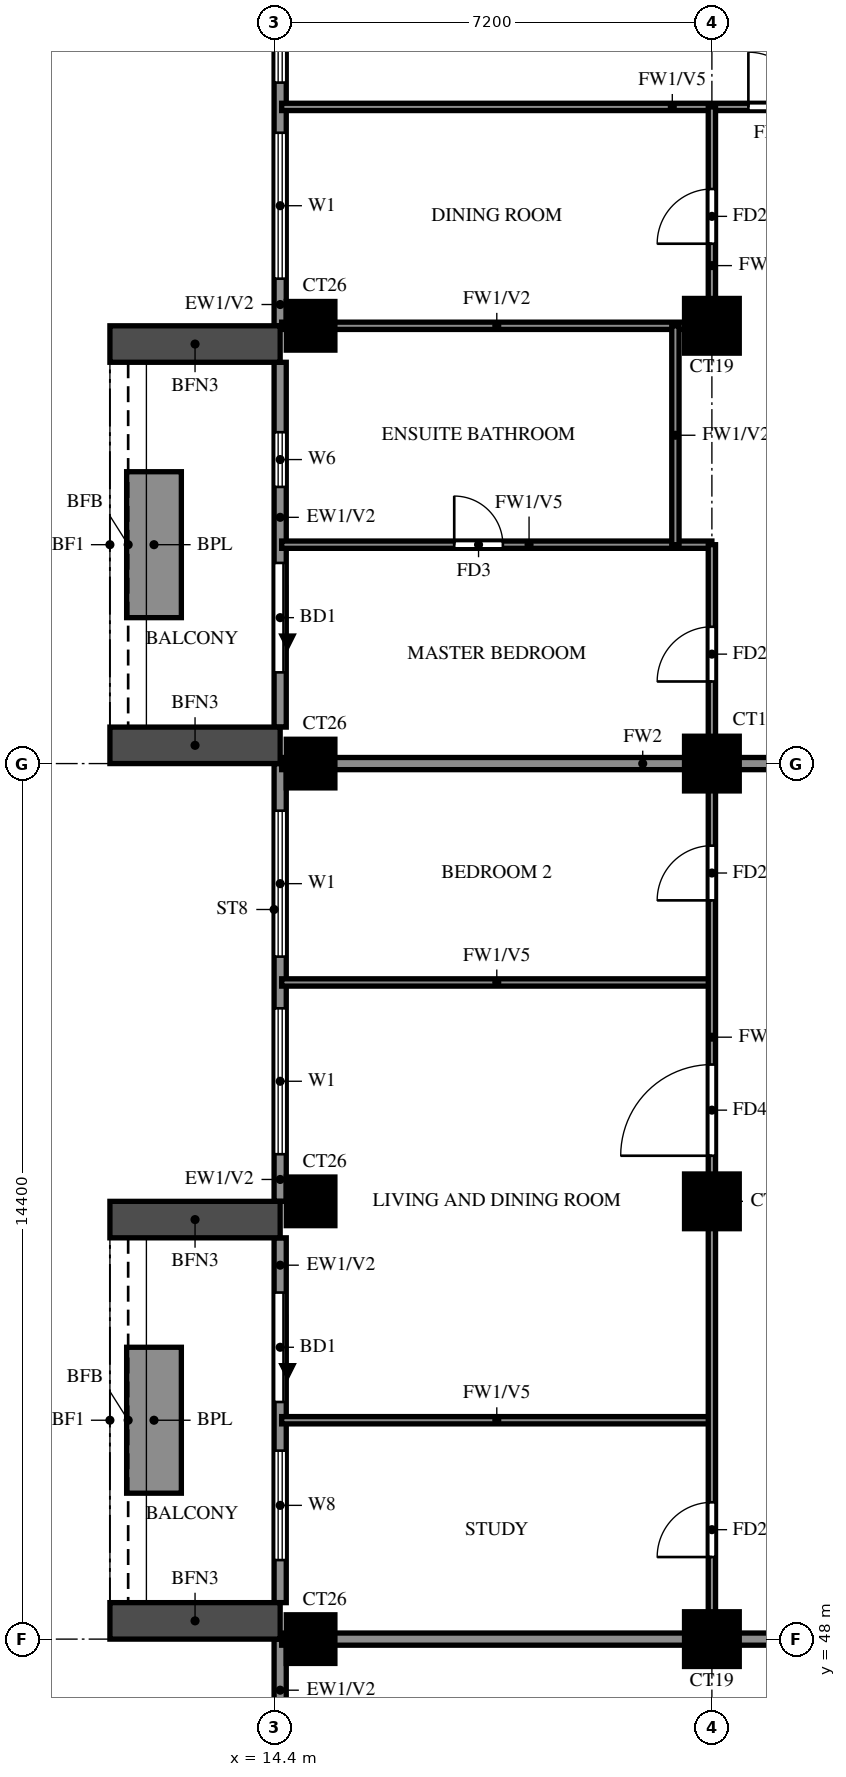
"""IFC4 building model, lengths in metres.
Left out: names, types, materials, properties, quantities, classifications, styles, units other than length and angle.
Written with IfcOpenShell. Run it as: python <this file> out.ifc"""

import sys

from ifc_helpers import new_model, si_unit, direction, frame, frame_2d, origin, origin_2d, place, context, subcontext, project, spatial, rectangle, extrude, source, transform, mapped, element, fill, save


model = new_model("IFC4")
c1 = context("Model", 3, precision=1e-05, world=origin(), true_north=direction((0.0, 1.0)))
c2 = subcontext(c1, "Body", "Model", "MODEL_VIEW")
j1 = project(units=[si_unit("LENGTHUNIT", "METRE"), si_unit("PLANEANGLEUNIT", "RADIAN")], contexts=[c1])
p1 = place(None, origin())
s1 = spatial("IfcSite", under=j1, at=p1, CompositionType="ELEMENT")
p2 = place(p1, origin())
s2 = spatial("IfcBuilding", under=s1, at=p2, CompositionType="ELEMENT")
p3 = place(p2, frame((0.0, 0.0, 195.5)))
s3 = spatial("IfcBuildingStorey", under=s2, at=p3, CompositionType="ELEMENT", Elevation=195.5)
m1 = source(origin(), c2, "Body", "SweptSolid", [
    extrude(rectangle(XDim=0.8, YDim=0.8, at=origin_2d()), origin(), (0.0, 0.0, 1.0), 3.2),
])
p4 = place(p3, frame((15.0, 48.0, 0.0), z_axis=(0.0, 0.0, 1.0), x_axis=(1.0, 0.0, 0.0)))
e1 = element("IfcColumn", 1, at=p4, inside=s3, PredefinedType="COLUMN", context=c2, shape_type="MappedRepresentation", body=[
    mapped(m1, transform((0.0, 0.0, 0.0))),
])
m2 = source(origin(), c2, "Body", "SweptSolid", [
    extrude(rectangle(XDim=0.9, YDim=0.9, at=origin_2d()), origin(), (0.0, 0.0, 1.0), 3.2),
])
p5 = place(p3, frame((21.6, 48.0, 0.0), z_axis=(0.0, 0.0, 1.0), x_axis=(1.0, 0.0, 0.0)))
e2 = element("IfcColumn", 2, at=p5, inside=s3, PredefinedType="COLUMN", context=c2, shape_type="MappedRepresentation", body=[
    mapped(m2, transform((0.0, 0.0, 0.0))),
])
p6 = place(p3, frame((15.0, 55.2, 0.0), z_axis=(0.0, 0.0, 1.0), x_axis=(1.0, 0.0, 0.0)))
e3 = element("IfcColumn", 3, at=p6, inside=s3, PredefinedType="COLUMN", context=c2, shape_type="MappedRepresentation", body=[
    mapped(m1, transform((0.0, 0.0, 0.0))),
])
p7 = place(p3, frame((21.6, 55.2, 0.0), z_axis=(0.0, 0.0, 1.0), x_axis=(1.0, 0.0, 0.0)))
e4 = element("IfcColumn", 4, at=p7, inside=s3, PredefinedType="COLUMN", context=c2, shape_type="MappedRepresentation", body=[
    mapped(m2, transform((0.0, 0.0, 0.0))),
])
p8 = place(p3, frame((15.0, 62.4, 0.0), z_axis=(0.0, 0.0, 1.0), x_axis=(1.0, 0.0, 0.0)))
e5 = element("IfcColumn", 5, at=p8, inside=s3, PredefinedType="COLUMN", context=c2, shape_type="MappedRepresentation", body=[
    mapped(m1, transform((0.0, 0.0, 0.0))),
])
p9 = place(p3, frame((21.6, 62.4, 0.0), z_axis=(0.0, 0.0, 1.0), x_axis=(1.0, 0.0, 0.0)))
e6 = element("IfcColumn", 6, at=p9, inside=s3, PredefinedType="COLUMN", context=c2, shape_type="MappedRepresentation", body=[
    mapped(m2, transform((0.0, 0.0, 0.0))),
])
p10 = place(p3, frame((15.0, 69.6, 0.0), z_axis=(0.0, 0.0, 1.0), x_axis=(1.0, 0.0, 0.0)))
e7 = element("IfcColumn", 7, at=p10, inside=s3, PredefinedType="COLUMN", context=c2, shape_type="MappedRepresentation", body=[
    mapped(m1, transform((0.0, 0.0, 0.0))),
])
p11 = place(p3, frame((21.6, 69.6, 0.0), z_axis=(0.0, 0.0, 1.0), x_axis=(1.0, 0.0, 0.0)))
e8 = element("IfcColumn", 8, at=p11, inside=s3, PredefinedType="COLUMN", context=c2, shape_type="MappedRepresentation", body=[
    mapped(m2, transform((0.0, 0.0, 0.0))),
])
p12 = place(p3, frame((14.5, 76.6, 0.0), z_axis=(0.0, 0.0, 1.0), x_axis=(0.0, -1.0, 0.0)))
e9 = element("IfcWall", 9, at=p12, inside=s3, PredefinedType="SOLIDWALL", context=c2, shape_type="SweptSolid", body=[
    extrude(rectangle(XDim=7.0, YDim=0.2, at=frame_2d((3.5, 0.0))), origin(), (0.0, 0.0, 1.0), 3.2),
])
p13 = place(p12, frame((3.825, 0.0, 0.6)))
e10 = element("IfcOpeningElement", 10, at=p13, cuts=e9, PredefinedType="OPENING", context=c2, shape_type="SweptSolid", body=[
    extrude(rectangle(XDim=2.4, YDim=2.4, at=frame_2d((1.2, 1.2))), frame((0.0, 0.11, 0.0), z_axis=(0.0, -1.0, 0.0), x_axis=(1.0, 0.0, 0.0)), (0.0, 0.0, 1.0), 0.22),
])
p14 = place(p12, frame((0.6, 0.0, 0.6)))
e11 = element("IfcOpeningElement", 11, at=p14, cuts=e9, PredefinedType="OPENING", context=c2, shape_type="SweptSolid", body=[
    extrude(rectangle(XDim=2.4, YDim=2.4, at=frame_2d((1.2, 1.2))), frame((0.0, 0.11, 0.0), z_axis=(0.0, -1.0, 0.0), x_axis=(1.0, 0.0, 0.0)), (0.0, 0.0, 1.0), 0.22),
])
p15 = place(p3, frame((14.5, 69.0, 0.0), z_axis=(0.0, 0.0, 1.0), x_axis=(0.0, -1.0, 0.0)))
e12 = element("IfcWall", 12, at=p15, inside=s3, PredefinedType="SOLIDWALL", context=c2, shape_type="SweptSolid", body=[
    extrude(rectangle(XDim=6.0, YDim=0.2, at=frame_2d((3.0, 0.0))), origin(), (0.0, 0.0, 1.0), 3.2),
])
p16 = place(p15, frame((3.3, 0.0, 0.0)))
e13 = element("IfcOpeningElement", 13, at=p16, cuts=e12, PredefinedType="OPENING", context=c2, shape_type="SweptSolid", body=[
    extrude(rectangle(XDim=1.8, YDim=2.4, at=frame_2d((0.9, 1.2))), frame((0.0, 0.11, 0.0), z_axis=(0.0, -1.0, 0.0), x_axis=(1.0, 0.0, 0.0)), (0.0, 0.0, 1.0), 0.22),
])
p17 = place(p15, frame((1.15, 0.0, 1.5)))
e14 = element("IfcOpeningElement", 14, at=p17, cuts=e12, PredefinedType="OPENING", context=c2, shape_type="SweptSolid", body=[
    extrude(rectangle(XDim=0.9, YDim=0.9, at=frame_2d((0.45, 0.45))), frame((0.0, 0.11, 0.0), z_axis=(0.0, -1.0, 0.0), x_axis=(1.0, 0.0, 0.0)), (0.0, 0.0, 1.0), 0.22),
])
p18 = place(p3, frame((14.5, 62.4, 0.0), z_axis=(0.0, 0.0, 1.0), x_axis=(0.0, -1.0, 0.0)))
e15 = element("IfcWall", 15, at=p18, inside=s3, PredefinedType="SOLIDWALL", context=c2, shape_type="SweptSolid", body=[
    extrude(rectangle(XDim=7.2, YDim=0.2, at=frame_2d((3.6, 0.0))), origin(), (0.0, 0.0, 1.0), 3.2),
])
p19 = place(p18, frame((4.025, 0.0, 0.6)))
e16 = element("IfcOpeningElement", 16, at=p19, cuts=e15, PredefinedType="OPENING", context=c2, shape_type="SweptSolid", body=[
    extrude(rectangle(XDim=2.4, YDim=2.4, at=frame_2d((1.2, 1.2))), frame((0.0, 0.11, 0.0), z_axis=(0.0, -1.0, 0.0), x_axis=(1.0, 0.0, 0.0)), (0.0, 0.0, 1.0), 0.22),
])
p20 = place(p18, frame((0.775, 0.0, 0.6)))
e17 = element("IfcOpeningElement", 17, at=p20, cuts=e15, PredefinedType="OPENING", context=c2, shape_type="SweptSolid", body=[
    extrude(rectangle(XDim=2.4, YDim=2.4, at=frame_2d((1.2, 1.2))), frame((0.0, 0.11, 0.0), z_axis=(0.0, -1.0, 0.0), x_axis=(1.0, 0.0, 0.0)), (0.0, 0.0, 1.0), 0.22),
])
p21 = place(p3, frame((14.5, 54.6, 0.0), z_axis=(0.0, 0.0, 1.0), x_axis=(0.0, -1.0, 0.0)))
e18 = element("IfcWall", 18, at=p21, inside=s3, PredefinedType="SOLIDWALL", context=c2, shape_type="SweptSolid", body=[
    extrude(rectangle(XDim=6.0, YDim=0.2, at=frame_2d((3.0, 0.0))), origin(), (0.0, 0.0, 1.0), 3.2),
])
p22 = place(p21, frame((0.9, 0.0, 0.0)))
e19 = element("IfcOpeningElement", 19, at=p22, cuts=e18, PredefinedType="OPENING", context=c2, shape_type="SweptSolid", body=[
    extrude(rectangle(XDim=1.8, YDim=2.4, at=frame_2d((0.9, 1.2))), frame((0.0, 0.11, 0.0), z_axis=(0.0, -1.0, 0.0), x_axis=(1.0, 0.0, 0.0)), (0.0, 0.0, 1.0), 0.22),
])
p23 = place(p21, frame((3.5, 0.0, 0.6)))
e20 = element("IfcOpeningElement", 20, at=p23, cuts=e18, PredefinedType="OPENING", context=c2, shape_type="SweptSolid", body=[
    extrude(rectangle(XDim=1.8, YDim=2.4, at=frame_2d((0.9, 1.2))), frame((0.0, 0.11, 0.0), z_axis=(0.0, -1.0, 0.0), x_axis=(1.0, 0.0, 0.0)), (0.0, 0.0, 1.0), 0.22),
])
p24 = place(p3, frame((14.5, 48.0, 0.0), z_axis=(0.0, 0.0, 1.0), x_axis=(0.0, -1.0, 0.0)))
e21 = element("IfcWall", 21, at=p24, inside=s3, PredefinedType="SOLIDWALL", context=c2, shape_type="SweptSolid", body=[
    extrude(rectangle(XDim=4.8, YDim=0.2, at=frame_2d((2.4, 0.0))), origin(), (0.0, 0.0, 1.0), 3.2),
])
p25 = place(p24, frame((1.275, 0.0, 0.6)))
e22 = element("IfcOpeningElement", 22, at=p25, cuts=e21, PredefinedType="OPENING", context=c2, shape_type="SweptSolid", body=[
    extrude(rectangle(XDim=2.4, YDim=2.4, at=frame_2d((1.2, 1.2))), frame((0.0, 0.11, 0.0), z_axis=(0.0, -1.0, 0.0), x_axis=(1.0, 0.0, 0.0)), (0.0, 0.0, 1.0), 0.22),
])
for number, where, z_axis, x_axis in (
    (23, (14.5, 69.3, 0.0), (0.0, 0.0, 1.0), (-1.0, 0.0, 0.0)),
    (24, (14.5, 62.7, 0.0), (0.0, 0.0, 1.0), (-1.0, 0.0, 0.0)),
):
    element("IfcWall", number, at=place(p3, frame(where, z_axis=z_axis, x_axis=x_axis)), inside=s3, PredefinedType="SOLIDWALL", context=c2, shape_type="SweptSolid", body=[
        extrude(rectangle(XDim=2.8, YDim=0.6, at=frame_2d((1.4, 0.0))), origin(), (0.0, 0.0, 1.0), 2.85),
    ])
p26 = place(p3, frame((12.425, 67.2, 0.0), z_axis=(0.0, 0.0, 1.0), x_axis=(0.0, -1.0, 0.0)))
e25 = element("IfcWall", 25, at=p26, inside=s3, PredefinedType="SOLIDWALL", context=c2, shape_type="SweptSolid", body=[
    extrude(rectangle(XDim=2.4, YDim=0.9, at=frame_2d((1.2, 0.0))), origin(), (0.0, 0.0, 1.0), 0.9),
])
for number, where, z_axis, x_axis in (
    (26, (14.5, 54.9, 0.0), (0.0, 0.0, 1.0), (-1.0, 0.0, 0.0)),
    (27, (14.5, 48.3, 0.0), (0.0, 0.0, 1.0), (-1.0, 0.0, 0.0)),
):
    element("IfcWall", number, at=place(p3, frame(where, z_axis=z_axis, x_axis=x_axis)), inside=s3, PredefinedType="SOLIDWALL", context=c2, shape_type="SweptSolid", body=[
        extrude(rectangle(XDim=2.8, YDim=0.6, at=frame_2d((1.4, 0.0))), origin(), (0.0, 0.0, 1.0), 2.85),
    ])
p27 = place(p3, frame((12.425, 52.8, 0.0), z_axis=(0.0, 0.0, 1.0), x_axis=(0.0, -1.0, 0.0)))
e28 = element("IfcWall", 28, at=p27, inside=s3, PredefinedType="SOLIDWALL", context=c2, shape_type="SweptSolid", body=[
    extrude(rectangle(XDim=2.4, YDim=0.9, at=frame_2d((1.2, 0.0))), origin(), (0.0, 0.0, 1.0), 0.9),
])
p28 = place(p3, frame((14.525, 48.0, 0.0), z_axis=(0.0, 0.0, 1.0), x_axis=(1.0, 0.0, 0.0)))
e29 = element("IfcWall", 29, at=p28, inside=s3, PredefinedType="SOLIDWALL", context=c2, shape_type="SweptSolid", body=[
    extrude(rectangle(XDim=19.075, YDim=0.2, at=frame_2d((9.538, 0.0))), origin(), (0.0, 0.0, 1.0), 3.2),
])
p29 = place(p3, frame((14.525, 62.4, 0.0), z_axis=(0.0, 0.0, 1.0), x_axis=(1.0, 0.0, 0.0)))
e30 = element("IfcWall", 30, at=p29, inside=s3, PredefinedType="SOLIDWALL", context=c2, shape_type="SweptSolid", body=[
    extrude(rectangle(XDim=11.875, YDim=0.2, at=frame_2d((5.938, 0.0))), origin(), (0.0, 0.0, 1.0), 3.2),
])
for number, where, z_axis, x_axis in (
    (31, (14.525, 51.6, 0.0), (0.0, 0.0, 1.0), (1.0, 0.0, 0.0)),
    (32, (14.525, 58.8, 0.0), (0.0, 0.0, 1.0), (1.0, 0.0, 0.0)),
):
    element("IfcWall", number, at=place(p3, frame(where, z_axis=z_axis, x_axis=x_axis)), inside=s3, PredefinedType="PARTITIONING", context=c2, shape_type="SweptSolid", body=[
        extrude(rectangle(XDim=7.075, YDim=0.12, at=frame_2d((3.538, 0.0))), origin(), (0.0, 0.0, 1.0), 2.3),
    ])
p30 = place(p3, frame((14.525, 66.0, 0.0), z_axis=(0.0, 0.0, 1.0), x_axis=(1.0, 0.0, 0.0)))
e33 = element("IfcWall", 33, at=p30, inside=s3, PredefinedType="PARTITIONING", context=c2, shape_type="SweptSolid", body=[
    extrude(rectangle(XDim=7.075, YDim=0.12, at=frame_2d((3.538, 0.0))), origin(), (0.0, 0.0, 1.0), 2.3),
])
p31 = place(p30, frame((2.837, 0.0, 0.0)))
e34 = element("IfcOpeningElement", 34, at=p31, cuts=e33, PredefinedType="OPENING", context=c2, shape_type="SweptSolid", body=[
    extrude(rectangle(XDim=0.8, YDim=2.1, at=frame_2d((0.4, 1.05))), frame((0.0, 0.07, 0.0), z_axis=(0.0, -1.0, 0.0), x_axis=(1.0, 0.0, 0.0)), (0.0, 0.0, 1.0), 0.14),
])
p32 = place(p3, frame((14.525, 69.6, 0.0), z_axis=(0.0, 0.0, 1.0), x_axis=(1.0, 0.0, 0.0)))
e35 = element("IfcWall", 35, at=p32, inside=s3, PredefinedType="PARTITIONING", context=c2, shape_type="SweptSolid", body=[
    extrude(rectangle(XDim=7.075, YDim=0.12, at=frame_2d((3.538, 0.0))), origin(), (0.0, 0.0, 1.0), 3.2),
])
p33 = place(p3, frame((14.525, 73.2, 0.0), z_axis=(0.0, 0.0, 1.0), x_axis=(1.0, 0.0, 0.0)))
e36 = element("IfcWall", 36, at=p33, inside=s3, PredefinedType="PARTITIONING", context=c2, shape_type="SweptSolid", body=[
    extrude(rectangle(XDim=14.275, YDim=0.12, at=frame_2d((7.138, 0.0))), origin(), (0.0, 0.0, 1.0), 2.3),
])
p34 = place(p33, frame((7.675, 0.0, 0.0)))
e37 = element("IfcOpeningElement", 37, at=p34, cuts=e36, PredefinedType="OPENING", context=c2, shape_type="SweptSolid", body=[
    extrude(rectangle(XDim=0.9, YDim=2.1, at=frame_2d((0.45, 1.05))), frame((0.0, 0.07, 0.0), z_axis=(0.0, -1.0, 0.0), x_axis=(1.0, 0.0, 0.0)), (0.0, 0.0, 1.0), 0.14),
])
p35 = place(p3, frame((21.0, 66.0, 0.0), z_axis=(0.0, 0.0, 1.0), x_axis=(0.0, 1.0, 0.0)))
e38 = element("IfcWall", 38, at=p35, inside=s3, PredefinedType="PARTITIONING", context=c2, shape_type="SweptSolid", body=[
    extrude(rectangle(XDim=3.6, YDim=0.12, at=frame_2d((1.8, 0.0))), origin(), (0.0, 0.0, 1.0), 3.2),
])
p36 = place(p3, frame((21.6, 48.0, 0.0), z_axis=(0.0, 0.0, 1.0), x_axis=(0.0, 1.0, 0.0)))
e39 = element("IfcWall", 39, at=p36, inside=s3, PredefinedType="PARTITIONING", context=c2, shape_type="SweptSolid", body=[
    extrude(rectangle(XDim=18.0, YDim=0.12, at=frame_2d((9.0, 0.0))), origin(), (0.0, 0.0, 1.0), 3.2),
])
p37 = place(p36, frame((1.35, 0.0, 0.0)))
e40 = element("IfcOpeningElement", 40, at=p37, cuts=e39, PredefinedType="OPENING", context=c2, shape_type="SweptSolid", body=[
    extrude(rectangle(XDim=0.9, YDim=2.1, at=frame_2d((0.45, 1.05))), frame((0.0, 0.07, 0.0), z_axis=(0.0, -1.0, 0.0), x_axis=(1.0, 0.0, 0.0)), (0.0, 0.0, 1.0), 0.14),
])
p38 = place(p36, frame((7.95, 0.0, 0.0)))
e41 = element("IfcOpeningElement", 41, at=p38, cuts=e39, PredefinedType="OPENING", context=c2, shape_type="SweptSolid", body=[
    extrude(rectangle(XDim=1.5, YDim=2.1, at=frame_2d((0.75, 1.05))), frame((0.0, 0.07, 0.0), z_axis=(0.0, -1.0, 0.0), x_axis=(1.0, 0.0, 0.0)), (0.0, 0.0, 1.0), 0.14),
])
p39 = place(p36, frame((12.15, 0.0, 0.0)))
e42 = element("IfcOpeningElement", 42, at=p39, cuts=e39, PredefinedType="OPENING", context=c2, shape_type="SweptSolid", body=[
    extrude(rectangle(XDim=0.9, YDim=2.1, at=frame_2d((0.45, 1.05))), frame((0.0, 0.07, 0.0), z_axis=(0.0, -1.0, 0.0), x_axis=(1.0, 0.0, 0.0)), (0.0, 0.0, 1.0), 0.14),
])
p40 = place(p36, frame((15.75, 0.0, 0.0)))
e43 = element("IfcOpeningElement", 43, at=p40, cuts=e39, PredefinedType="OPENING", context=c2, shape_type="SweptSolid", body=[
    extrude(rectangle(XDim=0.9, YDim=2.1, at=frame_2d((0.45, 1.05))), frame((0.0, 0.07, 0.0), z_axis=(0.0, -1.0, 0.0), x_axis=(1.0, 0.0, 0.0)), (0.0, 0.0, 1.0), 0.14),
])
p41 = place(p3, frame((21.6, 69.6, 0.0), z_axis=(0.0, 0.0, 1.0), x_axis=(0.0, 1.0, 0.0)))
e44 = element("IfcWall", 44, at=p41, inside=s3, PredefinedType="PARTITIONING", context=c2, shape_type="SweptSolid", body=[
    extrude(rectangle(XDim=3.6, YDim=0.12, at=frame_2d((1.8, 0.0))), origin(), (0.0, 0.0, 1.0), 3.2),
])
p42 = place(p41, frame((1.35, 0.0, 0.0)))
e45 = element("IfcOpeningElement", 45, at=p42, cuts=e44, PredefinedType="OPENING", context=c2, shape_type="SweptSolid", body=[
    extrude(rectangle(XDim=0.9, YDim=2.1, at=frame_2d((0.45, 1.05))), frame((0.0, 0.07, 0.0), z_axis=(0.0, -1.0, 0.0), x_axis=(1.0, 0.0, 0.0)), (0.0, 0.0, 1.0), 0.14),
])
p43 = place(p13, origin())
e46 = element("IfcWindow", 46, at=p43, inside=s3, PartitioningType="DOUBLE_PANEL_VERTICAL", PredefinedType="WINDOW", context=c2, shape_type="SweptSolid", body=[
    extrude(rectangle(XDim=2.4, YDim=2.4, at=frame_2d((1.2, 1.2))), frame((0.0, 0.03, 0.0), z_axis=(0.0, -1.0, 0.0), x_axis=(1.0, 0.0, 0.0)), (0.0, 0.0, 1.0), 0.06),
])
fill(e10, e46)
p44 = place(p14, origin())
e47 = element("IfcWindow", 47, at=p44, inside=s3, PartitioningType="DOUBLE_PANEL_VERTICAL", PredefinedType="WINDOW", context=c2, shape_type="SweptSolid", body=[
    extrude(rectangle(XDim=2.4, YDim=2.4, at=frame_2d((1.2, 1.2))), frame((0.0, 0.03, 0.0), z_axis=(0.0, -1.0, 0.0), x_axis=(1.0, 0.0, 0.0)), (0.0, 0.0, 1.0), 0.06),
])
fill(e11, e47)
p45 = place(p16, origin())
e48 = element("IfcDoor", 48, at=p45, inside=s3, OperationType="DOUBLE_DOOR_SLIDING", PredefinedType="DOOR", context=c2, shape_type="SweptSolid", body=[
    extrude(rectangle(XDim=1.8, YDim=2.4, at=frame_2d((0.9, 1.2))), frame((0.0, 0.025, 0.0), z_axis=(0.0, -1.0, 0.0), x_axis=(1.0, 0.0, 0.0)), (0.0, 0.0, 1.0), 0.05),
])
fill(e13, e48)
p46 = place(p17, origin())
e49 = element("IfcWindow", 49, at=p46, inside=s3, PartitioningType="SINGLE_PANEL", PredefinedType="WINDOW", context=c2, shape_type="SweptSolid", body=[
    extrude(rectangle(XDim=0.9, YDim=0.9, at=frame_2d((0.45, 0.45))), frame((0.0, 0.03, 0.0), z_axis=(0.0, -1.0, 0.0), x_axis=(1.0, 0.0, 0.0)), (0.0, 0.0, 1.0), 0.06),
])
fill(e14, e49)
p47 = place(p19, origin())
e50 = element("IfcWindow", 50, at=p47, inside=s3, PartitioningType="DOUBLE_PANEL_VERTICAL", PredefinedType="WINDOW", context=c2, shape_type="SweptSolid", body=[
    extrude(rectangle(XDim=2.4, YDim=2.4, at=frame_2d((1.2, 1.2))), frame((0.0, 0.03, 0.0), z_axis=(0.0, -1.0, 0.0), x_axis=(1.0, 0.0, 0.0)), (0.0, 0.0, 1.0), 0.06),
])
fill(e16, e50)
p48 = place(p20, origin())
e51 = element("IfcWindow", 51, at=p48, inside=s3, PartitioningType="DOUBLE_PANEL_VERTICAL", PredefinedType="WINDOW", context=c2, shape_type="SweptSolid", body=[
    extrude(rectangle(XDim=2.4, YDim=2.4, at=frame_2d((1.2, 1.2))), frame((0.0, 0.03, 0.0), z_axis=(0.0, -1.0, 0.0), x_axis=(1.0, 0.0, 0.0)), (0.0, 0.0, 1.0), 0.06),
])
fill(e17, e51)
p49 = place(p22, origin())
e52 = element("IfcDoor", 52, at=p49, inside=s3, OperationType="DOUBLE_DOOR_SLIDING", PredefinedType="DOOR", context=c2, shape_type="SweptSolid", body=[
    extrude(rectangle(XDim=1.8, YDim=2.4, at=frame_2d((0.9, 1.2))), frame((0.0, 0.025, 0.0), z_axis=(0.0, -1.0, 0.0), x_axis=(1.0, 0.0, 0.0)), (0.0, 0.0, 1.0), 0.05),
])
fill(e19, e52)
p50 = place(p23, origin())
e53 = element("IfcWindow", 53, at=p50, inside=s3, PartitioningType="DOUBLE_PANEL_VERTICAL", PredefinedType="WINDOW", context=c2, shape_type="SweptSolid", body=[
    extrude(rectangle(XDim=1.8, YDim=2.4, at=frame_2d((0.9, 1.2))), frame((0.0, 0.03, 0.0), z_axis=(0.0, -1.0, 0.0), x_axis=(1.0, 0.0, 0.0)), (0.0, 0.0, 1.0), 0.06),
])
fill(e20, e53)
p51 = place(p37, origin())
e54 = element("IfcDoor", 54, at=p51, inside=s3, OperationType="SINGLE_SWING_LEFT", PredefinedType="DOOR", context=c2, shape_type="SweptSolid", body=[
    extrude(rectangle(XDim=0.9, YDim=2.1, at=frame_2d((0.45, 1.05))), frame((0.0, 0.025, 0.0), z_axis=(0.0, -1.0, 0.0), x_axis=(1.0, 0.0, 0.0)), (0.0, 0.0, 1.0), 0.05),
])
fill(e40, e54)
p52 = place(p38, origin())
e55 = element("IfcDoor", 55, at=p52, inside=s3, OperationType="SINGLE_SWING_LEFT", PredefinedType="DOOR", context=c2, shape_type="SweptSolid", body=[
    extrude(rectangle(XDim=1.5, YDim=2.1, at=frame_2d((0.75, 1.05))), frame((0.0, 0.025, 0.0), z_axis=(0.0, -1.0, 0.0), x_axis=(1.0, 0.0, 0.0)), (0.0, 0.0, 1.0), 0.05),
])
fill(e41, e55)
p53 = place(p39, origin())
e56 = element("IfcDoor", 56, at=p53, inside=s3, OperationType="SINGLE_SWING_LEFT", PredefinedType="DOOR", context=c2, shape_type="SweptSolid", body=[
    extrude(rectangle(XDim=0.9, YDim=2.1, at=frame_2d((0.45, 1.05))), frame((0.0, 0.025, 0.0), z_axis=(0.0, -1.0, 0.0), x_axis=(1.0, 0.0, 0.0)), (0.0, 0.0, 1.0), 0.05),
])
fill(e42, e56)
p54 = place(p40, origin())
e57 = element("IfcDoor", 57, at=p54, inside=s3, OperationType="SINGLE_SWING_LEFT", PredefinedType="DOOR", context=c2, shape_type="SweptSolid", body=[
    extrude(rectangle(XDim=0.9, YDim=2.1, at=frame_2d((0.45, 1.05))), frame((0.0, 0.025, 0.0), z_axis=(0.0, -1.0, 0.0), x_axis=(1.0, 0.0, 0.0)), (0.0, 0.0, 1.0), 0.05),
])
fill(e43, e57)
p55 = place(p31, origin())
e58 = element("IfcDoor", 58, at=p55, inside=s3, OperationType="SINGLE_SWING_RIGHT", PredefinedType="DOOR", context=c2, shape_type="SweptSolid", body=[
    extrude(rectangle(XDim=0.8, YDim=2.1, at=frame_2d((0.4, 1.05))), frame((0.0, 0.025, 0.0), z_axis=(0.0, -1.0, 0.0), x_axis=(1.0, 0.0, 0.0)), (0.0, 0.0, 1.0), 0.05),
])
fill(e34, e58)
p56 = place(p42, origin())
e59 = element("IfcDoor", 59, at=p56, inside=s3, OperationType="SINGLE_SWING_LEFT", PredefinedType="DOOR", context=c2, shape_type="SweptSolid", body=[
    extrude(rectangle(XDim=0.9, YDim=2.1, at=frame_2d((0.45, 1.05))), frame((0.0, 0.025, 0.0), z_axis=(0.0, -1.0, 0.0), x_axis=(1.0, 0.0, 0.0)), (0.0, 0.0, 1.0), 0.05),
])
fill(e45, e59)
p57 = place(p34, origin())
e60 = element("IfcDoor", 60, at=p57, inside=s3, OperationType="SINGLE_SWING_LEFT", PredefinedType="DOOR", context=c2, shape_type="SweptSolid", body=[
    extrude(rectangle(XDim=0.9, YDim=2.1, at=frame_2d((0.45, 1.05))), frame((0.0, 0.025, 0.0), z_axis=(0.0, -1.0, 0.0), x_axis=(1.0, 0.0, 0.0)), (0.0, 0.0, 1.0), 0.05),
])
fill(e37, e60)
save(model, sys.argv[1])
